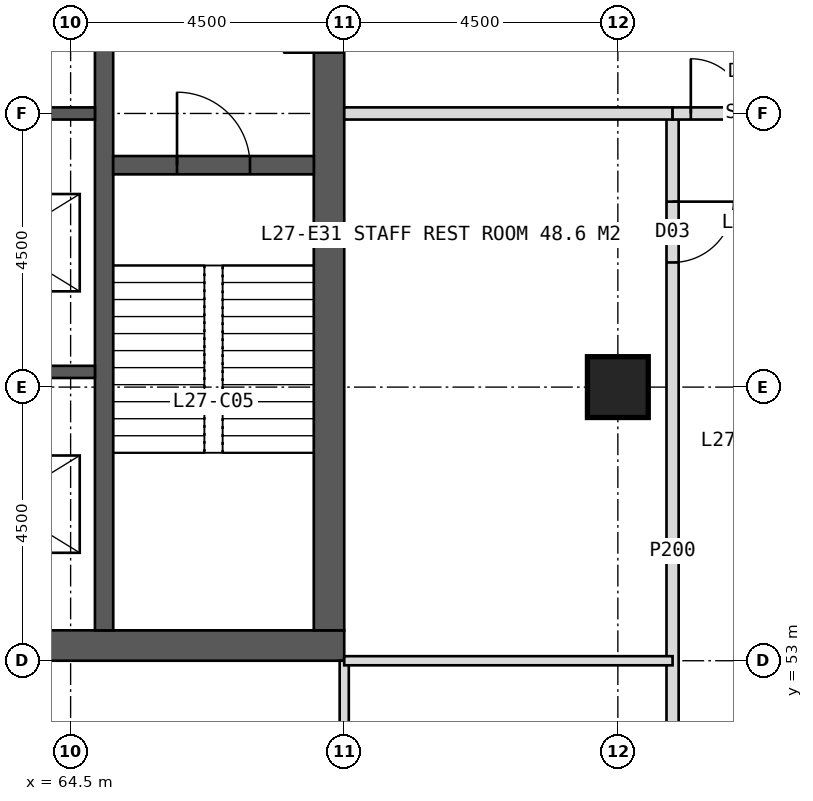
"""IFC4 building model, lengths in metres.
Left out: names, types, materials, properties, quantities, classifications, styles, units other than length and angle.
Written with IfcOpenShell. Run it as: python <this file> out.ifc"""

import sys

from ifc_helpers import new_model, si_unit, direction, frame, frame_2d, origin, origin_2d, place, context, subcontext, project, spatial, rectangle, hollow_rectangle, extrude, element, fill, save


model = new_model("IFC4")
c1 = context("Model", 3, precision=1e-05, world=origin(), true_north=direction((0.0, 1.0)))
c2 = subcontext(c1, "Body", "Model", "MODEL_VIEW")
j1 = project(units=[si_unit("LENGTHUNIT", "METRE"), si_unit("PLANEANGLEUNIT", "RADIAN")], contexts=[c1])
p1 = place(None, origin())
s1 = spatial("IfcSite", under=j1, at=p1, CompositionType="ELEMENT")
p2 = place(p1, origin())
s2 = spatial("IfcBuilding", under=s1, at=p2, CompositionType="ELEMENT")
p3 = place(p2, frame((0.0, 0.0, 116.0)))
s3 = spatial("IfcBuildingStorey", under=s2, at=p3, CompositionType="ELEMENT", Elevation=116.0)
p4 = place(p3, frame((51.0, 53.25, 0.0), z_axis=(0.0, 0.0, 1.0), x_axis=(1.0, 0.0, 0.0)))
e1 = element("IfcWall", 1, at=p4, inside=s3, PredefinedType="SHEAR", context=c2, shape_type="SweptSolid", body=[
    extrude(rectangle(XDim=18.0, YDim=0.5, at=frame_2d((9.0, 0.0))), origin(), (0.0, 0.0, 1.0), 4.0),
])
p5 = place(p4, frame((8.1, 0.0, 0.0)))
e2 = element("IfcOpeningElement", 2, at=p5, cuts=e1, PredefinedType="OPENING", context=c2, shape_type="SweptSolid", body=[
    extrude(rectangle(XDim=1.8, YDim=2.2, at=frame_2d((0.9, 1.1))), frame((0.0, 0.26, 0.0), z_axis=(0.0, -1.0, 0.0), x_axis=(1.0, 0.0, 0.0)), (0.0, 0.0, 1.0), 0.52),
])
p6 = place(p3, frame((68.75, 53.5, 0.0), z_axis=(0.0, 0.0, 1.0), x_axis=(0.0, 1.0, 0.0)))
e3 = element("IfcWall", 3, at=p6, inside=s3, PredefinedType="SHEAR", context=c2, shape_type="SweptSolid", body=[
    extrude(rectangle(XDim=17.0, YDim=0.5, at=frame_2d((8.5, 0.0))), origin(), (0.0, 0.0, 1.0), 4.0),
])
p7 = place(p6, frame((9.5, 0.0, 0.0)))
e4 = element("IfcOpeningElement", 4, at=p7, cuts=e3, PredefinedType="OPENING", context=c2, shape_type="SweptSolid", body=[
    extrude(rectangle(XDim=1.5, YDim=2.2, at=frame_2d((0.75, 1.1))), frame((0.0, 0.26, 0.0), z_axis=(0.0, -1.0, 0.0), x_axis=(1.0, 0.0, 0.0)), (0.0, 0.0, 1.0), 0.52),
])
p8 = place(p3, frame((65.05, 53.5, 0.0), z_axis=(0.0, 0.0, 1.0), x_axis=(0.0, 1.0, 0.0)))
e5 = element("IfcWall", 5, at=p8, inside=s3, PredefinedType="SHEAR", context=c2, shape_type="SweptSolid", body=[
    extrude(rectangle(XDim=17.0, YDim=0.3, at=frame_2d((8.5, 0.0))), origin(), (0.0, 0.0, 1.0), 4.0),
])
for number, where, z_axis, x_axis in (
    (6, (61.85, 57.75, 0.0), (0.0, 0.0, 1.0), (1.0, 0.0, 0.0)),
    (7, (61.85, 62.0, 0.0), (0.0, 0.0, 1.0), (1.0, 0.0, 0.0)),
):
    element("IfcWall", number, at=place(p3, frame(where, z_axis=z_axis, x_axis=x_axis)), inside=s3, PredefinedType="SHEAR", context=c2, shape_type="SweptSolid", body=[
        extrude(rectangle(XDim=3.05, YDim=0.2, at=frame_2d((1.525, 0.0))), origin(), (0.0, 0.0, 1.0), 4.0),
    ])
p9 = place(p3, frame((65.2, 61.15, 0.0), z_axis=(0.0, 0.0, 1.0), x_axis=(1.0, 0.0, 0.0)))
e8 = element("IfcWall", 8, at=p9, inside=s3, PredefinedType="SHEAR", context=c2, shape_type="SweptSolid", body=[
    extrude(rectangle(XDim=3.3, YDim=0.3, at=frame_2d((1.65, 0.0))), origin(), (0.0, 0.0, 1.0), 4.0),
])
p10 = place(p9, frame((1.05, 0.0, 0.0)))
e9 = element("IfcOpeningElement", 9, at=p10, cuts=e8, PredefinedType="OPENING", context=c2, shape_type="SweptSolid", body=[
    extrude(rectangle(XDim=1.2, YDim=2.1, at=frame_2d((0.6, 1.05))), frame((0.0, 0.16, 0.0), z_axis=(0.0, -1.0, 0.0), x_axis=(1.0, 0.0, 0.0)), (0.0, 0.0, 1.0), 0.32),
])
p11 = place(p3, frame((73.5, 57.5, 0.0), z_axis=(0.0, 0.0, 1.0), x_axis=(1.0, 0.0, 0.0)))
e10 = element("IfcColumn", 10, at=p11, inside=s3, PredefinedType="COLUMN", context=c2, shape_type="SweptSolid", body=[
    extrude(hollow_rectangle(XDim=1.0, YDim=1.0, WallThickness=0.1, at=origin_2d()), origin(), (0.0, 0.0, 1.0), 4.0),
])
p12 = place(p3, frame((69.0, 53.0, 0.0), z_axis=(0.0, 0.0, 1.0), x_axis=(0.0, -1.0, 0.0)))
e11 = element("IfcWall", 11, at=p12, inside=s3, PredefinedType="PARTITIONING", context=c2, shape_type="SweptSolid", body=[
    extrude(rectangle(XDim=5.4, YDim=0.15, at=frame_2d((2.7, 0.0))), origin(), (0.0, 0.0, 1.0), 3.75),
])
p13 = place(p3, frame((74.4, 62.0, 0.0), z_axis=(0.0, 0.0, 1.0), x_axis=(0.0, -1.0, 0.0)))
e12 = element("IfcWall", 12, at=p13, inside=s3, PredefinedType="PARTITIONING", context=c2, shape_type="SweptSolid", body=[
    extrude(rectangle(XDim=14.4, YDim=0.2, at=frame_2d((7.2, 0.0))), origin(), (0.0, 0.0, 1.0), 3.75),
])
p14 = place(p13, frame((1.45, 0.0, 0.0)))
e13 = element("IfcOpeningElement", 13, at=p14, cuts=e12, PredefinedType="OPENING", context=c2, shape_type="SweptSolid", body=[
    extrude(rectangle(XDim=1.0, YDim=2.1, at=frame_2d((0.5, 1.05))), frame((0.0, 0.11, 0.0), z_axis=(0.0, -1.0, 0.0), x_axis=(1.0, 0.0, 0.0)), (0.0, 0.0, 1.0), 0.22),
])
p15 = place(p13, frame((11.2, 0.0, 0.0)))
e14 = element("IfcOpeningElement", 14, at=p15, cuts=e12, PredefinedType="OPENING", context=c2, shape_type="SweptSolid", body=[
    extrude(rectangle(XDim=1.0, YDim=2.1, at=frame_2d((0.5, 1.05))), frame((0.0, 0.11, 0.0), z_axis=(0.0, -1.0, 0.0), x_axis=(1.0, 0.0, 0.0)), (0.0, 0.0, 1.0), 0.22),
])
p16 = place(p3, frame((69.0, 62.0, 0.0), z_axis=(0.0, 0.0, 1.0), x_axis=(1.0, 0.0, 0.0)))
e15 = element("IfcWall", 15, at=p16, inside=s3, PredefinedType="SOLIDWALL", context=c2, shape_type="SweptSolid", body=[
    extrude(rectangle(XDim=5.4, YDim=0.2, at=frame_2d((2.7, 0.0))), origin(), (0.0, 0.0, 1.0), 2.95),
])
p17 = place(p3, frame((69.0, 53.0, 0.0), z_axis=(0.0, 0.0, 1.0), x_axis=(1.0, 0.0, 0.0)))
e16 = element("IfcWall", 16, at=p17, inside=s3, PredefinedType="PARTITIONING", context=c2, shape_type="SweptSolid", body=[
    extrude(rectangle(XDim=5.4, YDim=0.15, at=frame_2d((2.7, 0.0))), origin(), (0.0, 0.0, 1.0), 3.75),
])
p18 = place(p3, frame((74.4, 62.0, 0.0), z_axis=(0.0, 0.0, 1.0), x_axis=(1.0, 0.0, 0.0)))
e17 = element("IfcWall", 17, at=p18, inside=s3, PredefinedType="SOLIDWALL", context=c2, shape_type="SweptSolid", body=[
    extrude(rectangle(XDim=2.7, YDim=0.2, at=frame_2d((1.35, 0.0))), origin(), (0.0, 0.0, 1.0), 2.95),
])
p19 = place(p18, frame((0.3, 0.0, 0.0)))
e18 = element("IfcOpeningElement", 18, at=p19, cuts=e17, PredefinedType="OPENING", context=c2, shape_type="SweptSolid", body=[
    extrude(rectangle(XDim=1.8, YDim=2.2, at=frame_2d((0.9, 1.1))), frame((0.0, 0.11, 0.0), z_axis=(0.0, -1.0, 0.0), x_axis=(1.0, 0.0, 0.0)), (0.0, 0.0, 1.0), 0.22),
])
p20 = place(p14, origin())
e19 = element("IfcDoor", 19, at=p20, inside=s3, OperationType="SINGLE_SWING_LEFT", PredefinedType="DOOR", context=c2, shape_type="SweptSolid", body=[
    extrude(rectangle(XDim=1.0, YDim=2.1, at=frame_2d((0.5, 1.05))), frame((0.0, 0.025, 0.0), z_axis=(0.0, -1.0, 0.0), x_axis=(1.0, 0.0, 0.0)), (0.0, 0.0, 1.0), 0.05),
])
fill(e13, e19)
p21 = place(p19, origin())
e20 = element("IfcDoor", 20, at=p21, inside=s3, OperationType="DOUBLE_DOOR_DOUBLE_SWING", PredefinedType="DOOR", context=c2, shape_type="SweptSolid", body=[
    extrude(rectangle(XDim=1.8, YDim=2.2, at=frame_2d((0.9, 1.1))), frame((0.0, 0.025, 0.0), z_axis=(0.0, -1.0, 0.0), x_axis=(1.0, 0.0, 0.0)), (0.0, 0.0, 1.0), 0.05),
])
fill(e18, e20)
p22 = place(p10, origin())
e21 = element("IfcDoor", 21, at=p22, inside=s3, OperationType="SINGLE_SWING_LEFT", PredefinedType="DOOR", context=c2, shape_type="SweptSolid", body=[
    extrude(rectangle(XDim=1.2, YDim=2.1, at=frame_2d((0.6, 1.05))), frame((0.0, 0.025, 0.0), z_axis=(0.0, -1.0, 0.0), x_axis=(1.0, 0.0, 0.0)), (0.0, 0.0, 1.0), 0.05),
])
fill(e9, e21)
save(model, sys.argv[1])
